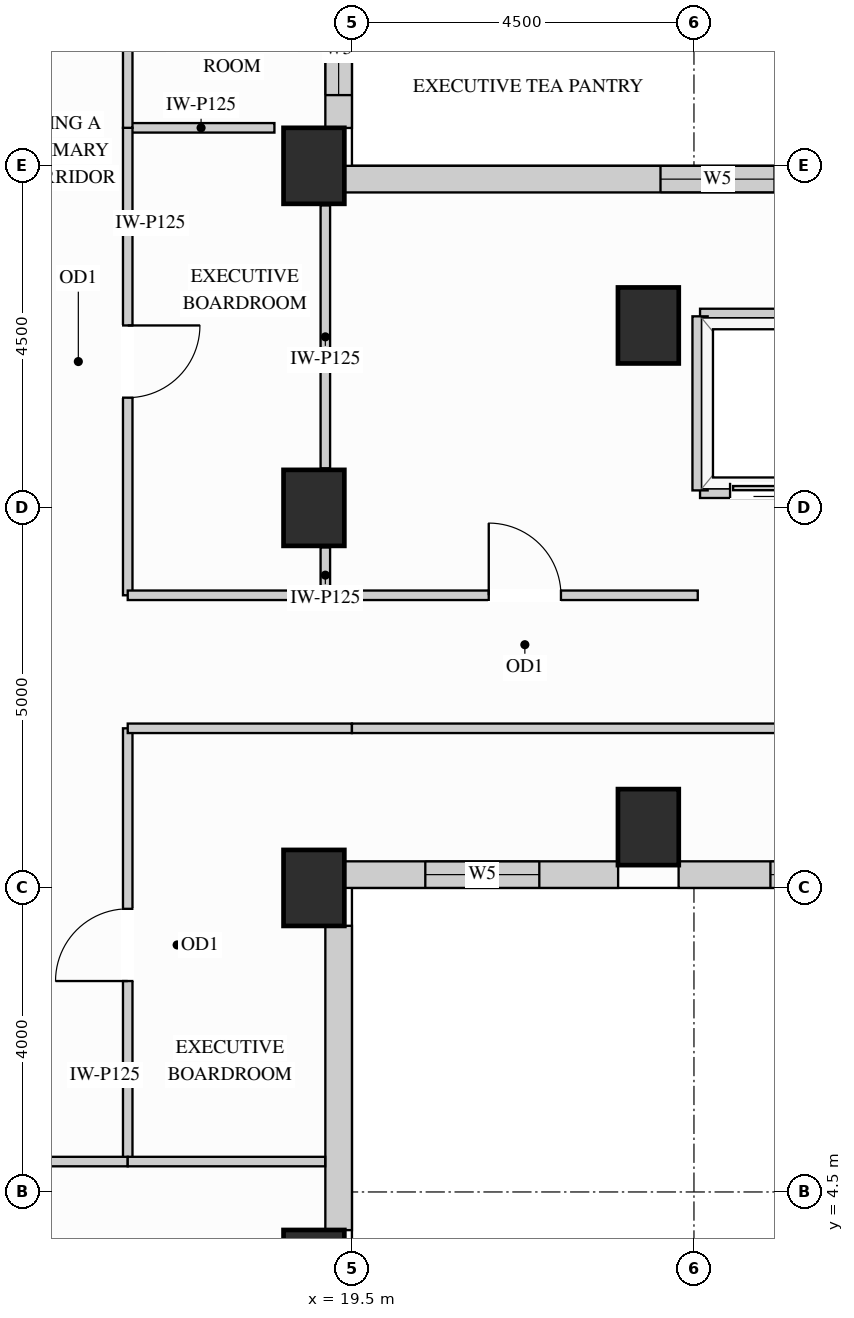
"""IFC4 building model, lengths in metres.
Left out: names, types, materials, properties, quantities, classifications, styles, units other than length and angle.
Written with IfcOpenShell. Run it as: python <this file> out.ifc"""

import sys

from ifc_helpers import new_model, si_unit, direction, frame, frame_2d, origin, origin_2d, place, context, subcontext, project, spatial, rectangle, extrude, source, transform, mapped, element, fill, save


model = new_model("IFC4")
c1 = context("Model", 3, precision=1e-05, world=origin(), true_north=direction((0.0, 1.0)))
c2 = subcontext(c1, "Body", "Model", "MODEL_VIEW")
j1 = project(units=[si_unit("LENGTHUNIT", "METRE"), si_unit("PLANEANGLEUNIT", "RADIAN")], contexts=[c1])
p1 = place(None, origin())
s1 = spatial("IfcSite", under=j1, at=p1, CompositionType="ELEMENT")
p2 = place(p1, origin())
s2 = spatial("IfcBuilding", under=s1, at=p2, CompositionType="ELEMENT")
p3 = place(p2, frame((0.0, 0.0, 179.1)))
s3 = spatial("IfcBuildingStorey", under=s2, at=p3, CompositionType="ELEMENT", Elevation=179.1)
m1 = source(origin(), c2, "Body", "SweptSolid", [
    extrude(rectangle(XDim=0.8, YDim=1.0, at=origin_2d()), origin(), (0.0, 0.0, 1.0), 3.4),
])
for number, where, z_axis, x_axis in (
    (1, (19.0, 13.5, 0.0), (0.0, 0.0, 1.0), (1.0, 0.0, 0.0)),
    (2, (19.0, 18.0, 0.0), (0.0, 0.0, 1.0), (1.0, 0.0, 0.0)),
    (3, (19.0, 3.5, 0.0), (0.0, 0.0, 1.0), (1.0, 0.0, 0.0)),
    (4, (19.0, 8.5, 0.0), (0.0, 0.0, 1.0), (1.0, 0.0, 0.0)),
    (5, (23.4, 15.9, 0.0), (0.0, 0.0, 1.0), (1.0, 0.0, 0.0)),
    (6, (23.4, 9.3, 0.0), (0.0, 0.0, 1.0), (1.0, 0.0, 0.0)),
):
    element("IfcColumn", number, at=place(p3, frame(where, z_axis=z_axis, x_axis=x_axis)), inside=s3, PredefinedType="COLUMN", context=c2, shape_type="MappedRepresentation", body=[
        mapped(m1, transform((0.0, 0.0, 0.0), x_axis=(1.0, 0.0, 0.0), y_axis=(0.0, 1.0, 0.0), z_axis=(0.0, 0.0, 1.0))),
    ])
m2 = source(origin(), c2, "Body", "SweptSolid", [
    extrude(rectangle(XDim=4.004, YDim=0.35, at=frame_2d((2.002, 0.0))), origin(), (0.0, 0.0, 1.0), 2.612),
])
p4 = place(p3, frame((19.325, 3.998, 0.0), z_axis=(0.0, 0.0, 1.0), x_axis=(0.0, 1.0, 0.0)))
e7 = element("IfcWall", 7, at=p4, inside=s3, PredefinedType="SOLIDWALL", context=c2, shape_type="MappedRepresentation", body=[
    mapped(m2, transform((0.0, 0.0, 0.0), x_axis=(1.0, 0.0, 0.0), y_axis=(0.0, 1.0, 0.0), z_axis=(0.0, 0.0, 1.0))),
])
p5 = place(p3, frame((19.398, 8.675, 0.0), z_axis=(0.0, 0.0, 1.0), x_axis=(1.0, 0.0, 0.0)))
e8 = element("IfcWall", 8, at=p5, inside=s3, PredefinedType="SOLIDWALL", context=c2, shape_type="SweptSolid", body=[
    extrude(rectangle(XDim=3.604, YDim=0.35, at=frame_2d((1.802, 0.0))), origin(), (0.0, 0.0, 1.0), 3.385),
])
p6 = place(p5, frame((1.067, 0.0, 0.78)))
e9 = element("IfcOpeningElement", 9, at=p6, cuts=e8, PredefinedType="OPENING", context=c2, shape_type="SweptSolid", body=[
    extrude(rectangle(XDim=1.5, YDim=2.0, at=frame_2d((0.75, 1.0))), frame((0.0, 0.185, 0.0), z_axis=(0.0, -1.0, 0.0), x_axis=(1.0, 0.0, 0.0)), (0.0, 0.0, 1.0), 0.37),
])
p7 = place(p3, frame((23.798, 8.675, 0.0), z_axis=(0.0, 0.0, 1.0), x_axis=(1.0, 0.0, 0.0)))
e10 = element("IfcWall", 10, at=p7, inside=s3, PredefinedType="SOLIDWALL", context=c2, shape_type="SweptSolid", body=[
    extrude(rectangle(XDim=6.304, YDim=0.35, at=frame_2d((3.152, 0.0))), origin(), (0.0, 0.0, 1.0), 3.385),
])
p8 = place(p7, frame((1.208, 0.0, 0.78)))
e11 = element("IfcOpeningElement", 11, at=p8, cuts=e10, PredefinedType="OPENING", context=c2, shape_type="SweptSolid", body=[
    extrude(rectangle(XDim=1.5, YDim=2.0, at=frame_2d((0.75, 1.0))), frame((0.0, 0.185, 0.0), z_axis=(0.0, -1.0, 0.0), x_axis=(1.0, 0.0, 0.0)), (0.0, 0.0, 1.0), 0.37),
])
p9 = place(p7, frame((3.596, 0.0, 0.78)))
e12 = element("IfcOpeningElement", 12, at=p9, cuts=e10, PredefinedType="OPENING", context=c2, shape_type="SweptSolid", body=[
    extrude(rectangle(XDim=1.5, YDim=2.0, at=frame_2d((0.75, 1.0))), frame((0.0, 0.185, 0.0), z_axis=(0.0, -1.0, 0.0), x_axis=(1.0, 0.0, 0.0)), (0.0, 0.0, 1.0), 0.37),
])
p10 = place(p3, frame((34.502, 17.825, 0.0), z_axis=(0.0, 0.0, 1.0), x_axis=(-1.0, 0.0, 0.0)))
e13 = element("IfcWall", 13, at=p10, inside=s3, PredefinedType="SOLIDWALL", context=c2, shape_type="SweptSolid", body=[
    extrude(rectangle(XDim=15.104, YDim=0.35, at=frame_2d((7.552, 0.0))), origin(), (0.0, 0.0, 1.0), 3.385),
])
p11 = place(p10, frame((4.131, 0.0, 0.78)))
e14 = element("IfcOpeningElement", 14, at=p11, cuts=e13, PredefinedType="OPENING", context=c2, shape_type="SweptSolid", body=[
    extrude(rectangle(XDim=1.5, YDim=2.0, at=frame_2d((0.75, 1.0))), frame((0.0, 0.185, 0.0), z_axis=(0.0, -1.0, 0.0), x_axis=(1.0, 0.0, 0.0)), (0.0, 0.0, 1.0), 0.37),
])
p12 = place(p10, frame((9.442, 0.0, 0.78)))
e15 = element("IfcOpeningElement", 15, at=p12, cuts=e13, PredefinedType="OPENING", context=c2, shape_type="SweptSolid", body=[
    extrude(rectangle(XDim=1.5, YDim=2.0, at=frame_2d((0.75, 1.0))), frame((0.0, 0.185, 0.0), z_axis=(0.0, -1.0, 0.0), x_axis=(1.0, 0.0, 0.0)), (0.0, 0.0, 1.0), 0.37),
])
p13 = place(p3, frame((19.325, 18.498, 0.0), z_axis=(0.0, 0.0, 1.0), x_axis=(0.0, 1.0, 0.0)))
e16 = element("IfcWall", 16, at=p13, inside=s3, PredefinedType="SOLIDWALL", context=c2, shape_type="SweptSolid", body=[
    extrude(rectangle(XDim=3.504, YDim=0.35, at=frame_2d((1.752, 0.0))), origin(), (0.0, 0.0, 1.0), 2.612),
])
p14 = place(p13, frame((0.433, 0.0, 0.78)))
e17 = element("IfcOpeningElement", 17, at=p14, cuts=e16, PredefinedType="OPENING", context=c2, shape_type="SweptSolid", body=[
    extrude(rectangle(XDim=1.2, YDim=1.652, at=frame_2d((0.6, 0.826))), frame((0.0, 0.185, 0.0), z_axis=(0.0, -1.0, 0.0), x_axis=(1.0, 0.0, 0.0)), (0.0, 0.0, 1.0), 0.37),
])
m3 = source(origin(), c2, "Body", "SweptSolid", [
    extrude(rectangle(XDim=1.93, YDim=0.125, at=frame_2d((0.965, 0.0))), origin(), (0.0, 0.0, 1.0), 3.385),
])
p15 = place(p3, frame((16.55, 18.5, 0.0), z_axis=(0.0, 0.0, 1.0), x_axis=(1.0, 0.0, 0.0)))
e18 = element("IfcWall", 18, at=p15, inside=s3, PredefinedType="PARTITIONING", context=c2, shape_type="MappedRepresentation", body=[
    mapped(m3, transform((0.0, 0.0, 0.0), x_axis=(1.0, 0.0, 0.0), y_axis=(0.0, 1.0, 0.0), z_axis=(0.0, 0.0, 1.0))),
])
m4 = source(origin(), c2, "Body", "SweptSolid", [
    extrude(rectangle(XDim=0.63, YDim=0.125, at=frame_2d((0.315, 0.0))), origin(), (0.0, 0.0, 1.0), 2.773),
])
p16 = place(p3, frame((19.15, 12.35, 0.0), z_axis=(0.0, 0.0, 1.0), x_axis=(0.0, 1.0, 0.0)))
e19 = element("IfcWall", 19, at=p16, inside=s3, PredefinedType="PARTITIONING", context=c2, shape_type="MappedRepresentation", body=[
    mapped(m4, transform((0.0, 0.0, 0.0), x_axis=(1.0, 0.0, 0.0), y_axis=(0.0, 1.0, 0.0), z_axis=(0.0, 0.0, 1.0))),
])
m5 = source(origin(), c2, "Body", "SweptSolid", [
    extrude(rectangle(XDim=3.46, YDim=0.125, at=frame_2d((1.73, 0.0))), origin(), (0.0, 0.0, 1.0), 2.773),
])
p17 = place(p3, frame((19.15, 14.02, 0.0), z_axis=(0.0, 0.0, 1.0), x_axis=(0.0, 1.0, 0.0)))
e20 = element("IfcWall", 20, at=p17, inside=s3, PredefinedType="PARTITIONING", context=c2, shape_type="MappedRepresentation", body=[
    mapped(m5, transform((0.0, 0.0, 0.0), x_axis=(1.0, 0.0, 0.0), y_axis=(0.0, 1.0, 0.0), z_axis=(0.0, 0.0, 1.0))),
])
p18 = place(p3, frame((16.55, 12.35, 0.0), z_axis=(0.0, 0.0, 1.0), x_axis=(0.0, 1.0, 0.0)))
e21 = element("IfcWall", 21, at=p18, inside=s3, PredefinedType="PARTITIONING", context=c2, shape_type="SweptSolid", body=[
    extrude(rectangle(XDim=6.15, YDim=0.125, at=frame_2d((3.075, 0.0))), origin(), (0.0, 0.0, 1.0), 3.385),
])
p19 = place(p18, frame((2.6, 0.0, 0.0)))
e22 = element("IfcOpeningElement", 22, at=p19, cuts=e21, PredefinedType="OPENING", context=c2, shape_type="SweptSolid", body=[
    extrude(rectangle(XDim=0.95, YDim=2.15, at=frame_2d((0.475, 1.075))), frame((0.0, 0.073, 0.0), z_axis=(0.0, -1.0, 0.0), x_axis=(1.0, 0.0, 0.0)), (0.0, 0.0, 1.0), 0.145),
])
p20 = place(p3, frame((16.55, 18.5, 0.0), z_axis=(0.0, 0.0, 1.0), x_axis=(0.0, 1.0, 0.0)))
e23 = element("IfcWall", 23, at=p20, inside=s3, PredefinedType="PARTITIONING", context=c2, shape_type="SweptSolid", body=[
    extrude(rectangle(XDim=4.85, YDim=0.125, at=frame_2d((2.425, 0.0))), origin(), (0.0, 0.0, 1.0), 3.385),
])
p21 = place(p20, frame((1.95, 0.0, 0.0)))
e24 = element("IfcOpeningElement", 24, at=p21, cuts=e23, PredefinedType="OPENING", context=c2, shape_type="SweptSolid", body=[
    extrude(rectangle(XDim=0.95, YDim=2.15, at=frame_2d((0.475, 1.075))), frame((0.0, 0.073, 0.0), z_axis=(0.0, -1.0, 0.0), x_axis=(1.0, 0.0, 0.0)), (0.0, 0.0, 1.0), 0.145),
])
p22 = place(p3, frame((16.55, 4.9, 0.0), z_axis=(0.0, 0.0, 1.0), x_axis=(0.0, 1.0, 0.0)))
e25 = element("IfcWall", 25, at=p22, inside=s3, PredefinedType="PARTITIONING", context=c2, shape_type="SweptSolid", body=[
    extrude(rectangle(XDim=5.7, YDim=0.125, at=frame_2d((2.85, 0.0))), origin(), (0.0, 0.0, 1.0), 3.385),
])
p23 = place(p22, frame((2.375, 0.0, 0.0)))
e26 = element("IfcOpeningElement", 26, at=p23, cuts=e25, PredefinedType="OPENING", context=c2, shape_type="SweptSolid", body=[
    extrude(rectangle(XDim=0.95, YDim=2.15, at=frame_2d((0.475, 1.075))), frame((0.0, 0.073, 0.0), z_axis=(0.0, -1.0, 0.0), x_axis=(1.0, 0.0, 0.0)), (0.0, 0.0, 1.0), 0.145),
])
m6 = source(origin(), c2, "Body", "SweptSolid", [
    extrude(rectangle(XDim=2.95, YDim=0.125, at=frame_2d((1.475, 0.0))), origin(), (0.0, 0.0, 1.0), 3.385),
])
p24 = place(p3, frame((16.55, 12.35, 0.0), z_axis=(0.0, 0.0, 1.0), x_axis=(1.0, 0.0, 0.0)))
e27 = element("IfcWall", 27, at=p24, inside=s3, PredefinedType="PARTITIONING", context=c2, shape_type="MappedRepresentation", body=[
    mapped(m6, transform((0.0, 0.0, 0.0), x_axis=(1.0, 0.0, 0.0), y_axis=(0.0, 1.0, 0.0), z_axis=(0.0, 0.0, 1.0))),
])
p25 = place(p3, frame((19.5, 12.35, 0.0), z_axis=(0.0, 0.0, 1.0), x_axis=(1.0, 0.0, 0.0)))
e28 = element("IfcWall", 28, at=p25, inside=s3, PredefinedType="PARTITIONING", context=c2, shape_type="SweptSolid", body=[
    extrude(rectangle(XDim=4.55, YDim=0.125, at=frame_2d((2.275, 0.0))), origin(), (0.0, 0.0, 1.0), 3.385),
])
p26 = place(p25, frame((1.8, 0.0, 0.0)))
e29 = element("IfcOpeningElement", 29, at=p26, cuts=e28, PredefinedType="OPENING", context=c2, shape_type="SweptSolid", body=[
    extrude(rectangle(XDim=0.95, YDim=2.15, at=frame_2d((0.475, 1.075))), frame((0.0, 0.073, 0.0), z_axis=(0.0, -1.0, 0.0), x_axis=(1.0, 0.0, 0.0)), (0.0, 0.0, 1.0), 0.145),
])
p27 = place(p3, frame((16.55, 10.6, 0.0), z_axis=(0.0, 0.0, 1.0), x_axis=(1.0, 0.0, 0.0)))
e30 = element("IfcWall", 30, at=p27, inside=s3, PredefinedType="PARTITIONING", context=c2, shape_type="MappedRepresentation", body=[
    mapped(m6, transform((0.0, 0.0, 0.0), x_axis=(1.0, 0.0, 0.0), y_axis=(0.0, 1.0, 0.0), z_axis=(0.0, 0.0, 1.0))),
])
p28 = place(p3, frame((19.5, 10.6, 0.0), z_axis=(0.0, 0.0, 1.0), x_axis=(1.0, 0.0, 0.0)))
e31 = element("IfcWall", 31, at=p28, inside=s3, PredefinedType="PARTITIONING", context=c2, shape_type="SweptSolid", body=[
    extrude(rectangle(XDim=14.9, YDim=0.125, at=frame_2d((7.45, 0.0))), origin(), (0.0, 0.0, 1.0), 3.385),
])
p29 = place(p28, frame((6.975, 0.0, 0.0)))
e32 = element("IfcOpeningElement", 32, at=p29, cuts=e31, PredefinedType="OPENING", context=c2, shape_type="SweptSolid", body=[
    extrude(rectangle(XDim=0.95, YDim=2.15, at=frame_2d((0.475, 1.075))), frame((0.0, 0.073, 0.0), z_axis=(0.0, -1.0, 0.0), x_axis=(1.0, 0.0, 0.0)), (0.0, 0.0, 1.0), 0.145),
])
p30 = place(p3, frame((10.213, 4.9, 0.0), z_axis=(0.0, 0.0, 1.0), x_axis=(1.0, 0.0, 0.0)))
e33 = element("IfcWall", 33, at=p30, inside=s3, PredefinedType="PARTITIONING", context=c2, shape_type="SweptSolid", body=[
    extrude(rectangle(XDim=6.337, YDim=0.125, at=frame_2d((3.168, 0.0))), origin(), (0.0, 0.0, 1.0), 2.848),
])
p31 = place(p30, frame((2.694, 0.0, 0.0)))
e34 = element("IfcOpeningElement", 34, at=p31, cuts=e33, PredefinedType="OPENING", context=c2, shape_type="SweptSolid", body=[
    extrude(rectangle(XDim=0.95, YDim=2.15, at=frame_2d((0.475, 1.075))), frame((0.0, 0.073, 0.0), z_axis=(0.0, -1.0, 0.0), x_axis=(1.0, 0.0, 0.0)), (0.0, 0.0, 1.0), 0.145),
])
m7 = source(origin(), c2, "Body", "SweptSolid", [
    extrude(rectangle(XDim=2.598, YDim=0.125, at=frame_2d((1.299, 0.0))), origin(), (0.0, 0.0, 1.0), 2.848),
])
p32 = place(p3, frame((16.55, 4.9, 0.0), z_axis=(0.0, 0.0, 1.0), x_axis=(1.0, 0.0, 0.0)))
e35 = element("IfcWall", 35, at=p32, inside=s3, PredefinedType="PARTITIONING", context=c2, shape_type="MappedRepresentation", body=[
    mapped(m7, transform((0.0, 0.0, 0.0), x_axis=(1.0, 0.0, 0.0), y_axis=(0.0, 1.0, 0.0), z_axis=(0.0, 0.0, 1.0))),
])
m8 = source(origin(), c2, "Body", "SweptSolid", [
    extrude(rectangle(XDim=1.89, YDim=0.2, at=frame_2d((0.945, 0.0))), origin(), (0.0, 0.0, 1.0), 2.773),
])
p33 = place(p3, frame((24.08, 16.02, 0.0), z_axis=(0.0, 0.0, 1.0), x_axis=(1.0, 0.0, 0.0)))
e36 = element("IfcWall", 36, at=p33, inside=s3, PredefinedType="PARTITIONING", context=c2, shape_type="MappedRepresentation", body=[
    mapped(m8, transform((0.0, 0.0, 0.0), x_axis=(1.0, 0.0, 0.0), y_axis=(0.0, 1.0, 0.0), z_axis=(0.0, 0.0, 1.0))),
])
p34 = place(p3, frame((24.08, 13.73, 0.0), z_axis=(0.0, 0.0, 1.0), x_axis=(1.0, 0.0, 0.0)))
e37 = element("IfcWall", 37, at=p34, inside=s3, PredefinedType="PARTITIONING", context=c2, shape_type="SweptSolid", body=[
    extrude(rectangle(XDim=1.89, YDim=0.2, at=frame_2d((0.945, 0.0))), origin(), (0.0, 0.0, 1.0), 2.466),
])
p35 = place(p34, frame((0.395, 0.0, 0.0)))
e38 = element("IfcOpeningElement", 38, at=p35, cuts=e37, PredefinedType="OPENING", context=c2, shape_type="SweptSolid", body=[
    extrude(rectangle(XDim=1.1, YDim=2.2, at=frame_2d((0.55, 1.1))), frame((0.0, 0.11, 0.0), z_axis=(0.0, -1.0, 0.0), x_axis=(1.0, 0.0, 0.0)), (0.0, 0.0, 1.0), 0.22),
])
m9 = source(origin(), c2, "Body", "SweptSolid", [
    extrude(rectangle(XDim=2.29, YDim=0.2, at=frame_2d((1.145, 0.0))), origin(), (0.0, 0.0, 1.0), 3.385),
])
p36 = place(p3, frame((24.08, 13.73, 0.0), z_axis=(0.0, 0.0, 1.0), x_axis=(0.0, 1.0, 0.0)))
e39 = element("IfcWall", 39, at=p36, inside=s3, PredefinedType="PARTITIONING", context=c2, shape_type="MappedRepresentation", body=[
    mapped(m9, transform((0.0, 0.0, 0.0), x_axis=(1.0, 0.0, 0.0), y_axis=(0.0, 1.0, 0.0), z_axis=(0.0, 0.0, 1.0))),
])
m10 = source(origin(), c2, "Body", "SweptSolid", [
    extrude(rectangle(XDim=1.1, YDim=2.2, at=frame_2d((0.55, 1.1))), frame((0.0, 0.025, 0.0), z_axis=(0.0, -1.0, 0.0), x_axis=(1.0, 0.0, 0.0)), (0.0, 0.0, 1.0), 0.05),
])
p37 = place(p35, origin())
e40 = element("IfcDoor", 40, at=p37, inside=s3, OperationType="SLIDING_TO_LEFT", PredefinedType="DOOR", context=c2, shape_type="MappedRepresentation", body=[
    mapped(m10, transform((0.0, 0.0, 0.0), x_axis=(1.0, 0.0, 0.0), y_axis=(0.0, 1.0, 0.0), z_axis=(0.0, 0.0, 1.0))),
])
fill(e38, e40)
m11 = source(origin(), c2, "Body", "SweptSolid", [
    extrude(rectangle(XDim=0.95, YDim=2.15, at=frame_2d((0.475, 1.075))), frame((0.0, 0.025, 0.0), z_axis=(0.0, -1.0, 0.0), x_axis=(1.0, 0.0, 0.0)), (0.0, 0.0, 1.0), 0.05),
])
p38 = place(p23, origin())
e41 = element("IfcDoor", 41, at=p38, inside=s3, OperationType="SINGLE_SWING_LEFT", PredefinedType="DOOR", context=c2, shape_type="MappedRepresentation", body=[
    mapped(m11, transform((0.0, 0.0, 0.0), x_axis=(1.0, 0.0, 0.0), y_axis=(0.0, 1.0, 0.0), z_axis=(0.0, 0.0, 1.0))),
])
fill(e26, e41)
p39 = place(p19, origin())
e42 = element("IfcDoor", 42, at=p39, inside=s3, OperationType="SINGLE_SWING_RIGHT", PredefinedType="DOOR", context=c2, shape_type="MappedRepresentation", body=[
    mapped(m11, transform((0.0, 0.0, 0.0), x_axis=(1.0, 0.0, 0.0), y_axis=(0.0, 1.0, 0.0), z_axis=(0.0, 0.0, 1.0))),
])
fill(e22, e42)
p40 = place(p26, origin())
e43 = element("IfcDoor", 43, at=p40, inside=s3, OperationType="SINGLE_SWING_LEFT", PredefinedType="DOOR", context=c2, shape_type="MappedRepresentation", body=[
    mapped(m11, transform((0.0, 0.0, 0.0), x_axis=(1.0, 0.0, 0.0), y_axis=(0.0, 1.0, 0.0), z_axis=(0.0, 0.0, 1.0))),
])
fill(e29, e43)
m12 = source(origin(), c2, "Body", "SweptSolid", [
    extrude(rectangle(XDim=1.2, YDim=1.652, at=frame_2d((0.6, 0.826))), frame((0.0, 0.03, 0.0), z_axis=(0.0, -1.0, 0.0), x_axis=(1.0, 0.0, 0.0)), (0.0, 0.0, 1.0), 0.06),
])
p41 = place(p14, origin())
e44 = element("IfcWindow", 44, at=p41, inside=s3, PartitioningType="SINGLE_PANEL", PredefinedType="WINDOW", context=c2, shape_type="MappedRepresentation", body=[
    mapped(m12, transform((0.0, 0.0, 0.0), x_axis=(1.0, 0.0, 0.0), y_axis=(0.0, 1.0, 0.0), z_axis=(0.0, 0.0, 1.0))),
])
fill(e17, e44)
m13 = source(origin(), c2, "Body", "SweptSolid", [
    extrude(rectangle(XDim=1.5, YDim=2.0, at=frame_2d((0.75, 1.0))), frame((0.0, 0.03, 0.0), z_axis=(0.0, -1.0, 0.0), x_axis=(1.0, 0.0, 0.0)), (0.0, 0.0, 1.0), 0.06),
])
p42 = place(p6, origin())
e45 = element("IfcWindow", 45, at=p42, inside=s3, PartitioningType="SINGLE_PANEL", PredefinedType="WINDOW", context=c2, shape_type="MappedRepresentation", body=[
    mapped(m13, transform((0.0, 0.0, 0.0), x_axis=(1.0, 0.0, 0.0), y_axis=(0.0, 1.0, 0.0), z_axis=(0.0, 0.0, 1.0))),
])
fill(e9, e45)
p43 = place(p8, origin())
e46 = element("IfcWindow", 46, at=p43, inside=s3, PartitioningType="SINGLE_PANEL", PredefinedType="WINDOW", context=c2, shape_type="MappedRepresentation", body=[
    mapped(m13, transform((0.0, 0.0, 0.0), x_axis=(1.0, 0.0, 0.0), y_axis=(0.0, 1.0, 0.0), z_axis=(0.0, 0.0, 1.0))),
])
fill(e11, e46)
p44 = place(p12, origin())
e47 = element("IfcWindow", 47, at=p44, inside=s3, PartitioningType="SINGLE_PANEL", PredefinedType="WINDOW", context=c2, shape_type="MappedRepresentation", body=[
    mapped(m13, transform((0.0, 0.0, 0.0), x_axis=(1.0, 0.0, 0.0), y_axis=(0.0, 1.0, 0.0), z_axis=(0.0, 0.0, 1.0))),
])
fill(e15, e47)
save(model, sys.argv[1])
